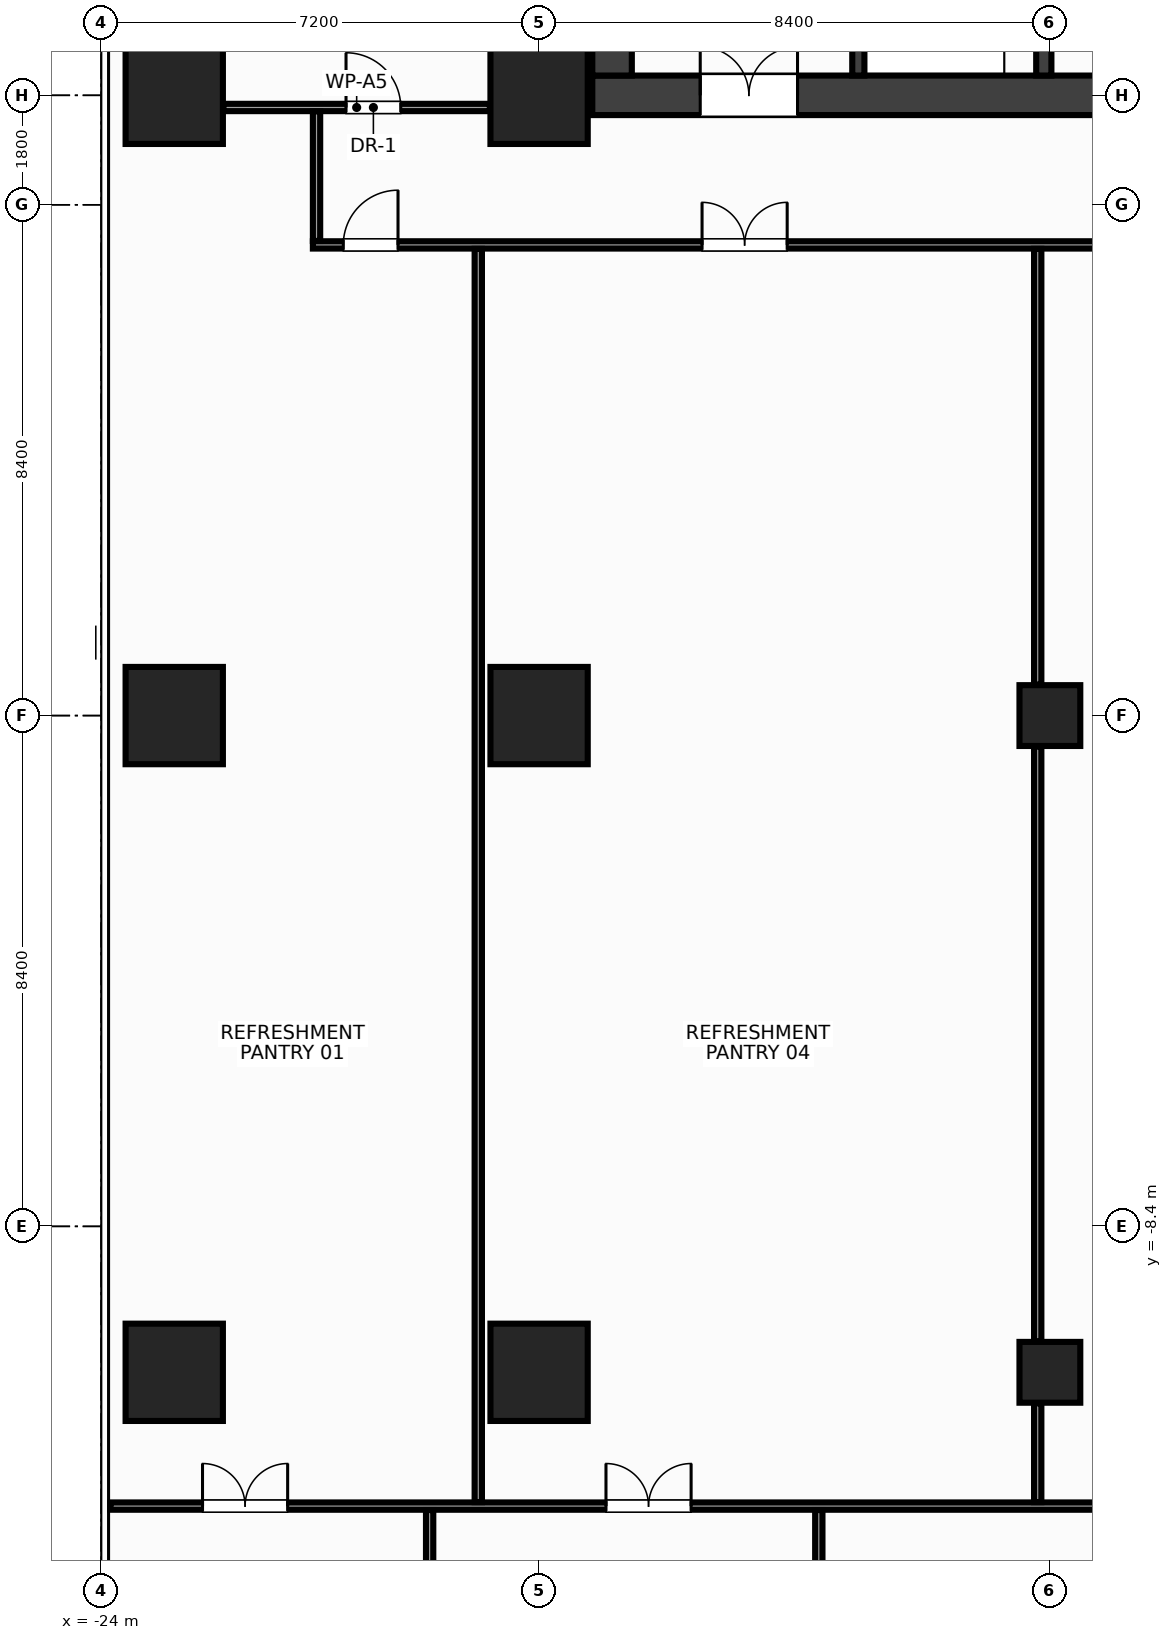
"""IFC4 building model, lengths in metres.
Left out: names, types, materials, properties, quantities, classifications, styles, units other than length and angle.
Written with IfcOpenShell. Run it as: python <this file> out.ifc"""

import sys

from ifc_helpers import new_model, si_unit, direction, frame, frame_2d, origin, origin_2d, place, context, subcontext, project, spatial, rectangle, hollow_rectangle, extrude, source, transform, mapped, element, fill, save


model = new_model("IFC4")
c1 = context("Model", 3, precision=1e-05, world=origin(), true_north=direction((0.0, 1.0)))
c2 = subcontext(c1, "Body", "Model", "MODEL_VIEW")
j1 = project(units=[si_unit("LENGTHUNIT", "METRE"), si_unit("PLANEANGLEUNIT", "RADIAN")], contexts=[c1])
p1 = place(None, origin())
s1 = spatial("IfcSite", under=j1, at=p1, CompositionType="ELEMENT")
p2 = place(p1, origin())
s2 = spatial("IfcBuilding", under=s1, at=p2, CompositionType="ELEMENT")
p3 = place(p2, frame((0.0, 0.0, 185.6)))
s3 = spatial("IfcBuildingStorey", under=s2, at=p3, CompositionType="ELEMENT", Elevation=185.6)
m1 = source(origin(), c2, "Body", "SweptSolid", [
    extrude(rectangle(XDim=31.85, YDim=0.65, at=frame_2d((15.925, 0.0))), origin(), (0.0, 0.0, 1.0), 3.6),
])
p4 = place(p3, frame((-15.925, 10.2, 0.0), z_axis=(0.0, 0.0, 1.0), x_axis=(1.0, 0.0, 0.0)))
e1 = element("IfcWall", 1, at=p4, inside=s3, PredefinedType="SHEAR", context=c2, shape_type="MappedRepresentation", body=[
    mapped(m1, transform((0.0, 0.0, 0.0), x_axis=(1.0, 0.0, 0.0), y_axis=(0.0, 1.0, 0.0), z_axis=(0.0, 0.0, 1.0), scale=1.0)),
])
p5 = place(p4, frame((1.775, 0.0, 0.0)))
e2 = element("IfcOpeningElement", 2, at=p5, cuts=e1, PredefinedType="OPENING", context=c2, shape_type="SweptSolid", body=[
    extrude(rectangle(XDim=1.6, YDim=2.15, at=frame_2d((0.8, 1.075))), frame((0.0, 0.337, 0.0), z_axis=(0.0, -1.0, 0.0), x_axis=(1.0, 0.0, 0.0)), (0.0, 0.0, 1.0), 0.674),
])
p6 = place(p4, frame((28.475, 0.0, 0.0)))
e3 = element("IfcOpeningElement", 3, at=p6, cuts=e1, PredefinedType="OPENING", context=c2, shape_type="SweptSolid", body=[
    extrude(rectangle(XDim=1.6, YDim=2.15, at=frame_2d((0.8, 1.075))), frame((0.0, 0.337, 0.0), z_axis=(0.0, -1.0, 0.0), x_axis=(1.0, 0.0, 0.0)), (0.0, 0.0, 1.0), 0.674),
])
p7 = place(p4, frame((15.175, 0.0, 0.0)))
e4 = element("IfcOpeningElement", 4, at=p7, cuts=e1, PredefinedType="OPENING", context=c2, shape_type="SweptSolid", body=[
    extrude(rectangle(XDim=1.5, YDim=2.2, at=frame_2d((0.75, 1.1))), frame((0.0, 0.337, 0.0), z_axis=(0.0, -1.0, 0.0), x_axis=(1.0, 0.0, 0.0)), (0.0, 0.0, 1.0), 0.674),
])
m2 = source(origin(), c2, "Body", "SweptSolid", [
    extrude(rectangle(XDim=12.95, YDim=0.65, at=frame_2d((6.475, 0.0))), origin(), (0.0, 0.0, 1.0), 3.6),
])
p8 = place(p3, frame((-15.6, 10.525, 0.0), z_axis=(0.0, 0.0, 1.0), x_axis=(0.0, 1.0, 0.0)))
e5 = element("IfcWall", 5, at=p8, inside=s3, PredefinedType="SHEAR", context=c2, shape_type="MappedRepresentation", body=[
    mapped(m2, transform((0.0, 0.0, 0.0), x_axis=(1.0, 0.0, 0.0), y_axis=(0.0, 1.0, 0.0), z_axis=(0.0, 0.0, 1.0), scale=1.0)),
])
m3 = source(origin(), c2, "Body", "SweptSolid", [
    extrude(rectangle(XDim=12.95, YDim=0.25, at=frame_2d((6.475, 0.0))), origin(), (0.0, 0.0, 1.0), 3.6),
])
p9 = place(p3, frame((-8.5, 10.525, 0.0), z_axis=(0.0, 0.0, 1.0), x_axis=(0.0, 1.0, 0.0)))
e6 = element("IfcWall", 6, at=p9, inside=s3, PredefinedType="SHEAR", context=c2, shape_type="MappedRepresentation", body=[
    mapped(m3, transform((0.0, 0.0, 0.0), x_axis=(1.0, 0.0, 0.0), y_axis=(0.0, 1.0, 0.0), z_axis=(0.0, 0.0, 1.0), scale=1.0)),
])
p10 = place(p9, frame((4.145, 0.0, 0.0)))
e7 = element("IfcOpeningElement", 7, at=p10, cuts=e6, PredefinedType="OPENING", context=c2, shape_type="SweptSolid", body=[
    extrude(rectangle(XDim=1.1, YDim=2.15, at=frame_2d((0.55, 1.075))), frame((0.0, 0.137, 0.0), z_axis=(0.0, -1.0, 0.0), x_axis=(1.0, 0.0, 0.0)), (0.0, 0.0, 1.0), 0.274),
])
p11 = place(p9, frame((6.065, 0.0, 0.0)))
e8 = element("IfcOpeningElement", 8, at=p11, cuts=e6, PredefinedType="OPENING", context=c2, shape_type="SweptSolid", body=[
    extrude(rectangle(XDim=1.1, YDim=2.15, at=frame_2d((0.55, 1.075))), frame((0.0, 0.137, 0.0), z_axis=(0.0, -1.0, 0.0), x_axis=(1.0, 0.0, 0.0)), (0.0, 0.0, 1.0), 0.274),
])
p12 = place(p9, frame((7.985, 0.0, 0.0)))
e9 = element("IfcOpeningElement", 9, at=p12, cuts=e6, PredefinedType="OPENING", context=c2, shape_type="SweptSolid", body=[
    extrude(rectangle(XDim=1.1, YDim=2.15, at=frame_2d((0.55, 1.075))), frame((0.0, 0.137, 0.0), z_axis=(0.0, -1.0, 0.0), x_axis=(1.0, 0.0, 0.0)), (0.0, 0.0, 1.0), 0.274),
])
m4 = source(origin(), c2, "Body", "SweptSolid", [
    extrude(rectangle(XDim=3.125, YDim=0.2, at=frame_2d((1.562, 0.0))), origin(), (0.0, 0.0, 1.0), 3.6),
])
p13 = place(p3, frame((-11.55, 10.525, 0.0), z_axis=(0.0, 0.0, 1.0), x_axis=(0.0, 1.0, 0.0)))
e10 = element("IfcWall", 10, at=p13, inside=s3, PredefinedType="SHEAR", context=c2, shape_type="MappedRepresentation", body=[
    mapped(m4, transform((0.0, 0.0, 0.0), x_axis=(1.0, 0.0, 0.0), y_axis=(0.0, 1.0, 0.0), z_axis=(0.0, 0.0, 1.0), scale=1.0)),
])
p14 = place(p13, frame((0.9, 0.0, 0.0)))
e11 = element("IfcOpeningElement", 11, at=p14, cuts=e10, PredefinedType="OPENING", context=c2, shape_type="SweptSolid", body=[
    extrude(rectangle(XDim=1.1, YDim=2.15, at=frame_2d((0.55, 1.075))), frame((0.0, 0.112, 0.0), z_axis=(0.0, -1.0, 0.0), x_axis=(1.0, 0.0, 0.0)), (0.0, 0.0, 1.0), 0.224),
])
m5 = source(origin(), c2, "Body", "SweptSolid", [
    extrude(rectangle(XDim=1.6, YDim=1.6, at=origin_2d()), origin(), (0.0, 0.0, 1.0), 3.6),
])
for number, where, z_axis, x_axis in (
    (12, (-16.8, -10.8, 0.0), (0.0, 0.0, 1.0), (1.0, 0.0, 0.0)),
    (13, (-16.8, 0.0, 0.0), (0.0, 0.0, 1.0), (1.0, 0.0, 0.0)),
    (14, (-16.8, 10.2, 0.0), (0.0, 0.0, 1.0), (1.0, 0.0, 0.0)),
    (15, (-22.8, -10.8, 0.0), (0.0, 0.0, 1.0), (1.0, 0.0, 0.0)),
    (16, (-22.8, 0.0, 0.0), (0.0, 0.0, 1.0), (1.0, 0.0, 0.0)),
    (17, (-22.8, 10.2, 0.0), (0.0, 0.0, 1.0), (1.0, 0.0, 0.0)),
):
    element("IfcColumn", number, at=place(p3, frame(where, z_axis=z_axis, x_axis=x_axis)), inside=s3, PredefinedType="COLUMN", context=c2, shape_type="MappedRepresentation", body=[
        mapped(m5, transform((0.0, 0.0, 0.0), x_axis=(1.0, 0.0, 0.0), y_axis=(0.0, 1.0, 0.0), z_axis=(0.0, 0.0, 1.0), scale=1.0)),
    ])
m6 = source(origin(), c2, "Body", "SweptSolid", [
    extrude(hollow_rectangle(XDim=1.0, YDim=1.0, WallThickness=0.045, at=origin_2d()), origin(), (0.0, 0.0, 1.0), 3.6),
])
for number, where, z_axis, x_axis in (
    (18, (-8.4, 0.0, 0.0), (0.0, 0.0, 1.0), (1.0, 0.0, 0.0)),
    (19, (-8.4, -10.8, 0.0), (0.0, 0.0, 1.0), (1.0, 0.0, 0.0)),
):
    element("IfcColumn", number, at=place(p3, frame(where, z_axis=z_axis, x_axis=x_axis)), inside=s3, PredefinedType="COLUMN", context=c2, shape_type="MappedRepresentation", body=[
        mapped(m6, transform((0.0, 0.0, 0.0), x_axis=(1.0, 0.0, 0.0), y_axis=(0.0, 1.0, 0.0), z_axis=(0.0, 0.0, 1.0), scale=1.0)),
    ])
m7 = source(origin(), c2, "Body", "SweptSolid", [
    extrude(rectangle(XDim=4.38, YDim=0.12, at=frame_2d((2.19, 0.0))), origin(), (0.0, 0.0, 1.0), 2.835),
])
p15 = place(p3, frame((-21.99, 10.0, 0.0), z_axis=(0.0, 0.0, 1.0), x_axis=(1.0, 0.0, 0.0)))
e20 = element("IfcWall", 20, at=p15, inside=s3, PredefinedType="PARTITIONING", context=c2, shape_type="MappedRepresentation", body=[
    mapped(m7, transform((0.0, 0.0, 0.0), x_axis=(1.0, 0.0, 0.0), y_axis=(0.0, 1.0, 0.0), z_axis=(0.0, 0.0, 1.0), scale=1.0)),
])
p16 = place(p15, frame((2.015, 0.0, 0.0)))
e21 = element("IfcOpeningElement", 21, at=p16, cuts=e20, PredefinedType="OPENING", context=c2, shape_type="SweptSolid", body=[
    extrude(rectangle(XDim=0.9, YDim=2.15, at=frame_2d((0.45, 1.075))), frame((0.0, 0.072, 0.0), z_axis=(0.0, -1.0, 0.0), x_axis=(1.0, 0.0, 0.0)), (0.0, 0.0, 1.0), 0.144),
])
m8 = source(origin(), c2, "Body", "SweptSolid", [
    extrude(rectangle(XDim=31.6, YDim=0.12, at=frame_2d((15.8, 0.0))), origin(), (0.0, 0.0, 1.0), 2.685),
])
p17 = place(p3, frame((-20.52, 7.74, 0.0), z_axis=(0.0, 0.0, 1.0), x_axis=(1.0, 0.0, 0.0)))
e22 = element("IfcWall", 22, at=p17, inside=s3, PredefinedType="PARTITIONING", context=c2, shape_type="MappedRepresentation", body=[
    mapped(m8, transform((0.0, 0.0, 0.0), x_axis=(1.0, 0.0, 0.0), y_axis=(0.0, 1.0, 0.0), z_axis=(0.0, 0.0, 1.0), scale=1.0)),
])
p18 = place(p17, frame((0.5, 0.0, 0.0)))
e23 = element("IfcOpeningElement", 23, at=p18, cuts=e22, PredefinedType="OPENING", context=c2, shape_type="SweptSolid", body=[
    extrude(rectangle(XDim=0.9, YDim=2.15, at=frame_2d((0.45, 1.075))), frame((0.0, 0.072, 0.0), z_axis=(0.0, -1.0, 0.0), x_axis=(1.0, 0.0, 0.0)), (0.0, 0.0, 1.0), 0.144),
])
p19 = place(p17, frame((6.4, 0.0, 0.0)))
e24 = element("IfcOpeningElement", 24, at=p19, cuts=e22, PredefinedType="OPENING", context=c2, shape_type="SweptSolid", body=[
    extrude(rectangle(XDim=1.4, YDim=2.2, at=frame_2d((0.7, 1.1))), frame((0.0, 0.072, 0.0), z_axis=(0.0, -1.0, 0.0), x_axis=(1.0, 0.0, 0.0)), (0.0, 0.0, 1.0), 0.144),
])
p20 = place(p17, frame((15.52, 0.0, 0.0)))
e25 = element("IfcOpeningElement", 25, at=p20, cuts=e22, PredefinedType="OPENING", context=c2, shape_type="SweptSolid", body=[
    extrude(rectangle(XDim=1.4, YDim=2.2, at=frame_2d((0.7, 1.1))), frame((0.0, 0.072, 0.0), z_axis=(0.0, -1.0, 0.0), x_axis=(1.0, 0.0, 0.0)), (0.0, 0.0, 1.0), 0.144),
])
p21 = place(p17, frame((24.12, 0.0, 0.0)))
e26 = element("IfcOpeningElement", 26, at=p21, cuts=e22, PredefinedType="OPENING", context=c2, shape_type="SweptSolid", body=[
    extrude(rectangle(XDim=1.4, YDim=2.2, at=frame_2d((0.7, 1.1))), frame((0.0, 0.072, 0.0), z_axis=(0.0, -1.0, 0.0), x_axis=(1.0, 0.0, 0.0)), (0.0, 0.0, 1.0), 0.144),
])
p22 = place(p17, frame((29.63, 0.0, 0.0)))
e27 = element("IfcOpeningElement", 27, at=p22, cuts=e22, PredefinedType="OPENING", context=c2, shape_type="SweptSolid", body=[
    extrude(rectangle(XDim=1.4, YDim=2.2, at=frame_2d((0.7, 1.1))), frame((0.0, 0.072, 0.0), z_axis=(0.0, -1.0, 0.0), x_axis=(1.0, 0.0, 0.0)), (0.0, 0.0, 1.0), 0.144),
])
m9 = source(origin(), c2, "Body", "SweptSolid", [
    extrude(rectangle(XDim=2.13, YDim=0.12, at=frame_2d((1.065, 0.0))), origin(), (0.0, 0.0, 1.0), 3.3),
])
p23 = place(p3, frame((-20.46, 7.805, 0.0), z_axis=(0.0, 0.0, 1.0), x_axis=(0.0, 1.0, 0.0)))
e28 = element("IfcWall", 28, at=p23, inside=s3, PredefinedType="PARTITIONING", context=c2, shape_type="MappedRepresentation", body=[
    mapped(m9, transform((0.0, 0.0, 0.0), x_axis=(1.0, 0.0, 0.0), y_axis=(0.0, 1.0, 0.0), z_axis=(0.0, 0.0, 1.0), scale=1.0)),
])
m10 = source(origin(), c2, "Body", "SweptSolid", [
    extrude(rectangle(XDim=34.925, YDim=0.12, at=frame_2d((17.462, 0.0))), origin(), (0.0, 0.0, 1.0), 2.885),
])
p24 = place(p3, frame((-23.85, -13.0, 0.0), z_axis=(0.0, 0.0, 1.0), x_axis=(1.0, 0.0, 0.0)))
e29 = element("IfcWall", 29, at=p24, inside=s3, PredefinedType="PARTITIONING", context=c2, shape_type="MappedRepresentation", body=[
    mapped(m10, transform((0.0, 0.0, 0.0), x_axis=(1.0, 0.0, 0.0), y_axis=(0.0, 1.0, 0.0), z_axis=(0.0, 0.0, 1.0), scale=1.0)),
])
p25 = place(p24, frame((1.515, 0.0, 0.0)))
e30 = element("IfcOpeningElement", 30, at=p25, cuts=e29, PredefinedType="OPENING", context=c2, shape_type="SweptSolid", body=[
    extrude(rectangle(XDim=1.4, YDim=2.2, at=frame_2d((0.7, 1.1))), frame((0.0, 0.072, 0.0), z_axis=(0.0, -1.0, 0.0), x_axis=(1.0, 0.0, 0.0)), (0.0, 0.0, 1.0), 0.144),
])
p26 = place(p24, frame((8.15, 0.0, 0.0)))
e31 = element("IfcOpeningElement", 31, at=p26, cuts=e29, PredefinedType="OPENING", context=c2, shape_type="SweptSolid", body=[
    extrude(rectangle(XDim=1.4, YDim=2.2, at=frame_2d((0.7, 1.1))), frame((0.0, 0.072, 0.0), z_axis=(0.0, -1.0, 0.0), x_axis=(1.0, 0.0, 0.0)), (0.0, 0.0, 1.0), 0.144),
])
m11 = source(origin(), c2, "Body", "SweptSolid", [
    extrude(rectangle(XDim=20.61, YDim=0.12, at=frame_2d((10.305, 0.0))), origin(), (0.0, 0.0, 1.0), 2.835),
])
p27 = place(p3, frame((-17.8, -12.935, 0.0), z_axis=(0.0, 0.0, 1.0), x_axis=(0.0, 1.0, 0.0)))
e32 = element("IfcWall", 32, at=p27, inside=s3, PredefinedType="PARTITIONING", context=c2, shape_type="MappedRepresentation", body=[
    mapped(m11, transform((0.0, 0.0, 0.0), x_axis=(1.0, 0.0, 0.0), y_axis=(0.0, 1.0, 0.0), z_axis=(0.0, 0.0, 1.0), scale=1.0)),
])
m12 = source(origin(), c2, "Body", "SweptSolid", [
    extrude(rectangle(XDim=1.625, YDim=0.12, at=frame_2d((0.812, 0.0))), origin(), (0.0, 0.0, 1.0), 2.885),
])
p28 = place(p3, frame((-8.6, -12.935, 0.0), z_axis=(0.0, 0.0, 1.0), x_axis=(0.0, 1.0, 0.0)))
e33 = element("IfcWall", 33, at=p28, inside=s3, PredefinedType="PARTITIONING", context=c2, shape_type="MappedRepresentation", body=[
    mapped(m12, transform((0.0, 0.0, 0.0), x_axis=(1.0, 0.0, 0.0), y_axis=(0.0, 1.0, 0.0), z_axis=(0.0, 0.0, 1.0), scale=1.0)),
])
m13 = source(origin(), c2, "Body", "SweptSolid", [
    extrude(rectangle(XDim=9.78, YDim=0.12, at=frame_2d((4.89, 0.0))), origin(), (0.0, 0.0, 1.0), 2.685),
])
p29 = place(p3, frame((-8.6, -10.29, 0.0), z_axis=(0.0, 0.0, 1.0), x_axis=(0.0, 1.0, 0.0)))
e34 = element("IfcWall", 34, at=p29, inside=s3, PredefinedType="PARTITIONING", context=c2, shape_type="MappedRepresentation", body=[
    mapped(m13, transform((0.0, 0.0, 0.0), x_axis=(1.0, 0.0, 0.0), y_axis=(0.0, 1.0, 0.0), z_axis=(0.0, 0.0, 1.0), scale=1.0)),
])
m14 = source(origin(), c2, "Body", "SweptSolid", [
    extrude(rectangle(XDim=7.165, YDim=0.12, at=frame_2d((3.583, 0.0))), origin(), (0.0, 0.0, 1.0), 2.585),
])
p30 = place(p3, frame((-8.6, 0.51, 0.0), z_axis=(0.0, 0.0, 1.0), x_axis=(0.0, 1.0, 0.0)))
e35 = element("IfcWall", 35, at=p30, inside=s3, PredefinedType="PARTITIONING", context=c2, shape_type="MappedRepresentation", body=[
    mapped(m14, transform((0.0, 0.0, 0.0), x_axis=(1.0, 0.0, 0.0), y_axis=(0.0, 1.0, 0.0), z_axis=(0.0, 0.0, 1.0), scale=1.0)),
])
m15 = source(origin(), c2, "Body", "SweptSolid", [
    extrude(rectangle(XDim=4.027, YDim=0.12, at=frame_2d((2.014, 0.0))), origin(), (0.0, 0.0, 1.0), 3.3),
])
p31 = place(p3, frame((-18.6, -17.092, 0.0), z_axis=(0.0, 0.0, 1.0), x_axis=(0.0, 1.0, 0.0)))
e36 = element("IfcWall", 36, at=p31, inside=s3, PredefinedType="PARTITIONING", context=c2, shape_type="MappedRepresentation", body=[
    mapped(m15, transform((0.0, 0.0, 0.0), x_axis=(1.0, 0.0, 0.0), y_axis=(0.0, 1.0, 0.0), z_axis=(0.0, 0.0, 1.0), scale=1.0)),
])
m16 = source(origin(), c2, "Body", "SweptSolid", [
    extrude(rectangle(XDim=9.585, YDim=0.12, at=frame_2d((4.792, 0.0))), origin(), (0.0, 0.0, 1.0), 2.835),
])
p32 = place(p3, frame((-12.2, -22.65, 0.0), z_axis=(0.0, 0.0, 1.0), x_axis=(0.0, 1.0, 0.0)))
e37 = element("IfcWall", 37, at=p32, inside=s3, PredefinedType="PARTITIONING", context=c2, shape_type="MappedRepresentation", body=[
    mapped(m16, transform((0.0, 0.0, 0.0), x_axis=(1.0, 0.0, 0.0), y_axis=(0.0, 1.0, 0.0), z_axis=(0.0, 0.0, 1.0), scale=1.0)),
])
m17 = source(origin(), c2, "Body", "SweptSolid", [
    extrude(rectangle(XDim=1.6, YDim=2.15, at=frame_2d((0.8, 1.075))), frame((0.0, 0.025, 0.0), z_axis=(0.0, -1.0, 0.0), x_axis=(1.0, 0.0, 0.0)), (0.0, 0.0, 1.0), 0.05),
])
p33 = place(p5, origin())
e38 = element("IfcDoor", 38, at=p33, inside=s3, OperationType="DOUBLE_DOOR_SINGLE_SWING", PredefinedType="DOOR", context=c2, shape_type="MappedRepresentation", body=[
    mapped(m17, transform((0.0, 0.0, 0.0), x_axis=(1.0, 0.0, 0.0), y_axis=(0.0, 1.0, 0.0), z_axis=(0.0, 0.0, 1.0), scale=1.0)),
])
fill(e2, e38)
m18 = source(origin(), c2, "Body", "SweptSolid", [
    extrude(rectangle(XDim=0.9, YDim=2.15, at=frame_2d((0.45, 1.075))), frame((0.0, 0.025, 0.0), z_axis=(0.0, -1.0, 0.0), x_axis=(1.0, 0.0, 0.0)), (0.0, 0.0, 1.0), 0.05),
])
p34 = place(p16, origin())
e39 = element("IfcDoor", 39, at=p34, inside=s3, OperationType="SINGLE_SWING_LEFT", PredefinedType="DOOR", context=c2, shape_type="MappedRepresentation", body=[
    mapped(m18, transform((0.0, 0.0, 0.0), x_axis=(1.0, 0.0, 0.0), y_axis=(0.0, 1.0, 0.0), z_axis=(0.0, 0.0, 1.0), scale=1.0)),
])
fill(e21, e39)
p35 = place(p18, origin())
e40 = element("IfcDoor", 40, at=p35, inside=s3, OperationType="SINGLE_SWING_RIGHT", PredefinedType="DOOR", context=c2, shape_type="MappedRepresentation", body=[
    mapped(m18, transform((0.0, 0.0, 0.0), x_axis=(1.0, 0.0, 0.0), y_axis=(0.0, 1.0, 0.0), z_axis=(0.0, 0.0, 1.0), scale=1.0)),
])
fill(e23, e40)
m19 = source(origin(), c2, "Body", "SweptSolid", [
    extrude(rectangle(XDim=1.4, YDim=2.2, at=frame_2d((0.7, 1.1))), frame((0.0, 0.025, 0.0), z_axis=(0.0, -1.0, 0.0), x_axis=(1.0, 0.0, 0.0)), (0.0, 0.0, 1.0), 0.05),
])
p36 = place(p19, origin())
e41 = element("IfcDoor", 41, at=p36, inside=s3, OperationType="DOUBLE_DOOR_SINGLE_SWING", PredefinedType="DOOR", context=c2, shape_type="MappedRepresentation", body=[
    mapped(m19, transform((0.0, 0.0, 0.0), x_axis=(1.0, 0.0, 0.0), y_axis=(0.0, 1.0, 0.0), z_axis=(0.0, 0.0, 1.0), scale=1.0)),
])
fill(e24, e41)
p37 = place(p25, origin())
e42 = element("IfcDoor", 42, at=p37, inside=s3, OperationType="DOUBLE_DOOR_SINGLE_SWING", PredefinedType="DOOR", context=c2, shape_type="MappedRepresentation", body=[
    mapped(m19, transform((0.0, 0.0, 0.0), x_axis=(1.0, 0.0, 0.0), y_axis=(0.0, 1.0, 0.0), z_axis=(0.0, 0.0, 1.0), scale=1.0)),
])
fill(e30, e42)
p38 = place(p26, origin())
e43 = element("IfcDoor", 43, at=p38, inside=s3, OperationType="DOUBLE_DOOR_SINGLE_SWING", PredefinedType="DOOR", context=c2, shape_type="MappedRepresentation", body=[
    mapped(m19, transform((0.0, 0.0, 0.0), x_axis=(1.0, 0.0, 0.0), y_axis=(0.0, 1.0, 0.0), z_axis=(0.0, 0.0, 1.0), scale=1.0)),
])
fill(e31, e43)
save(model, sys.argv[1])
